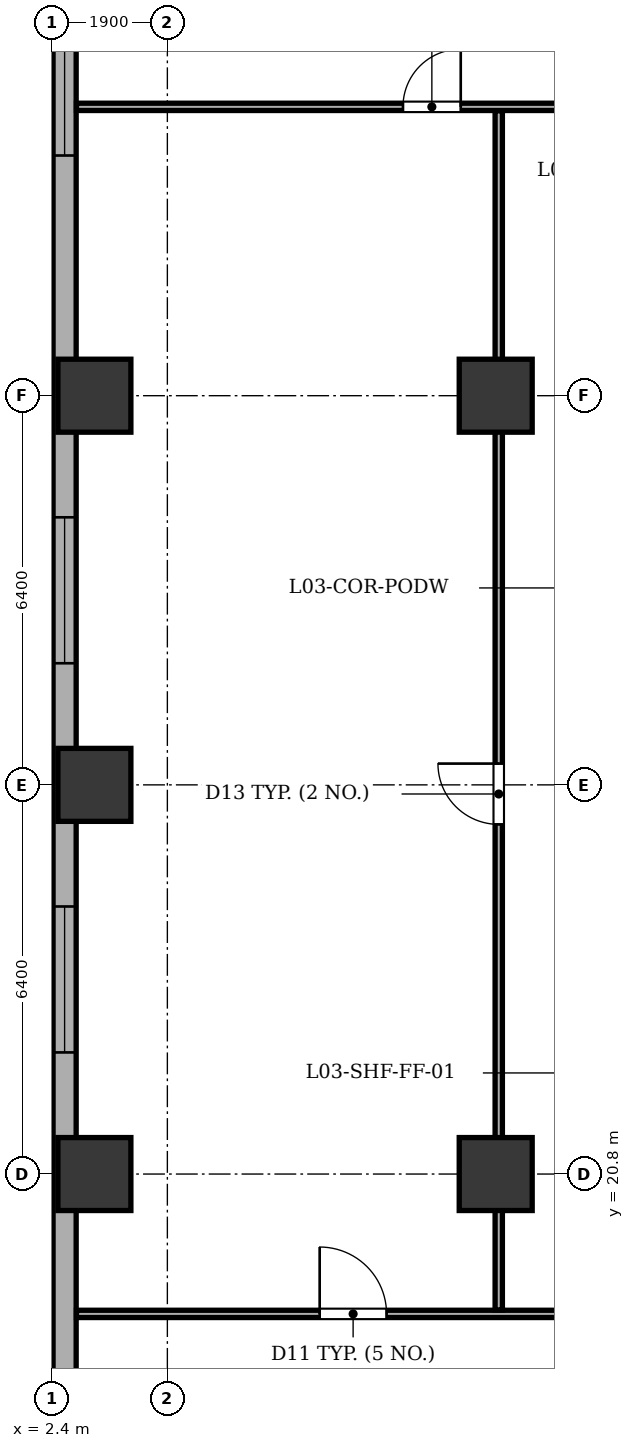
"""IFC4 building model, lengths in metres.
Left out: names, types, materials, properties, quantities, classifications, styles, units other than length and angle.
Written with IfcOpenShell. Run it as: python <this file> out.ifc"""

import sys

from ifc_helpers import new_model, si_unit, direction, frame, frame_2d, origin, origin_2d, place, context, subcontext, project, spatial, rectangle, extrude, element, fill, save


model = new_model("IFC4")
c1 = context("Model", 3, precision=1e-05, world=origin(), true_north=direction((0.0, 1.0)))
c2 = subcontext(c1, "Body", "Model", "MODEL_VIEW")
j1 = project(units=[si_unit("LENGTHUNIT", "METRE"), si_unit("PLANEANGLEUNIT", "RADIAN")], contexts=[c1])
p1 = place(None, origin())
s1 = spatial("IfcSite", under=j1, at=p1, CompositionType="ELEMENT")
p2 = place(p1, origin())
s2 = spatial("IfcBuilding", under=s1, at=p2, CompositionType="ELEMENT")
p3 = place(p2, frame((0.0, 0.0, 14.4)))
s3 = spatial("IfcBuildingStorey", under=s2, at=p3, CompositionType="ELEMENT", Elevation=14.4)
for number, where, z_axis, x_axis in (
    (1, (3.1, 20.8, 0.0), (0.0, 0.0, 1.0), (1.0, 0.0, 0.0)),
    (2, (3.1, 27.2, 0.0), (0.0, 0.0, 1.0), (1.0, 0.0, 0.0)),
    (3, (3.1, 33.6, 0.0), (0.0, 0.0, 1.0), (1.0, 0.0, 0.0)),
    (4, (9.7, 20.8, 0.0), (0.0, 0.0, 1.0), (1.0, 0.0, 0.0)),
    (5, (9.7, 33.6, 0.0), (0.0, 0.0, 1.0), (1.0, 0.0, 0.0)),
):
    element("IfcColumn", number, at=place(p3, frame(where, z_axis=z_axis, x_axis=x_axis)), inside=s3, PredefinedType="COLUMN", context=c2, shape_type="SweptSolid", body=[
        extrude(rectangle(XDim=1.2, YDim=1.2, at=origin_2d()), origin(), (0.0, 0.0, 1.0), 4.5),
    ])
p4 = place(p3, frame((2.61, 4.5, 0.0), z_axis=(0.0, 0.0, 1.0), x_axis=(0.0, 1.0, 0.0)))
e6 = element("IfcWall", 6, at=p4, inside=s3, PredefinedType="STANDARD", context=c2, shape_type="SweptSolid", body=[
    extrude(rectangle(XDim=45.4, YDim=0.38, at=frame_2d((22.7, 0.0))), origin(), (0.0, 0.0, 1.0), 4.0),
])
p5 = place(p4, frame((1.275, 0.0, 0.75)))
e7 = element("IfcOpeningElement", 7, at=p5, cuts=e6, PredefinedType="OPENING", context=c2, shape_type="SweptSolid", body=[
    extrude(rectangle(XDim=2.4, YDim=2.1, at=frame_2d((1.2, 1.05))), frame((0.0, 0.2, 0.0), z_axis=(0.0, -1.0, 0.0), x_axis=(1.0, 0.0, 0.0)), (0.0, 0.0, 1.0), 0.4),
])
p6 = place(p4, frame((9.95, 0.0, 0.75)))
e8 = element("IfcOpeningElement", 8, at=p6, cuts=e6, PredefinedType="OPENING", context=c2, shape_type="SweptSolid", body=[
    extrude(rectangle(XDim=2.4, YDim=2.1, at=frame_2d((1.2, 1.05))), frame((0.0, 0.2, 0.0), z_axis=(0.0, -1.0, 0.0), x_axis=(1.0, 0.0, 0.0)), (0.0, 0.0, 1.0), 0.4),
])
p7 = place(p4, frame((18.3, 0.0, 0.75)))
e9 = element("IfcOpeningElement", 9, at=p7, cuts=e6, PredefinedType="OPENING", context=c2, shape_type="SweptSolid", body=[
    extrude(rectangle(XDim=2.4, YDim=2.1, at=frame_2d((1.2, 1.05))), frame((0.0, 0.2, 0.0), z_axis=(0.0, -1.0, 0.0), x_axis=(1.0, 0.0, 0.0)), (0.0, 0.0, 1.0), 0.4),
])
p8 = place(p4, frame((24.7, 0.0, 0.75)))
e10 = element("IfcOpeningElement", 10, at=p8, cuts=e6, PredefinedType="OPENING", context=c2, shape_type="SweptSolid", body=[
    extrude(rectangle(XDim=2.4, YDim=2.1, at=frame_2d((1.2, 1.05))), frame((0.0, 0.2, 0.0), z_axis=(0.0, -1.0, 0.0), x_axis=(1.0, 0.0, 0.0)), (0.0, 0.0, 1.0), 0.4),
])
p9 = place(p4, frame((33.05, 0.0, 0.75)))
e11 = element("IfcOpeningElement", 11, at=p9, cuts=e6, PredefinedType="OPENING", context=c2, shape_type="SweptSolid", body=[
    extrude(rectangle(XDim=2.4, YDim=2.1, at=frame_2d((1.2, 1.05))), frame((0.0, 0.2, 0.0), z_axis=(0.0, -1.0, 0.0), x_axis=(1.0, 0.0, 0.0)), (0.0, 0.0, 1.0), 0.4),
])
p10 = place(p4, frame((41.725, 0.0, 0.75)))
e12 = element("IfcOpeningElement", 12, at=p10, cuts=e6, PredefinedType="OPENING", context=c2, shape_type="SweptSolid", body=[
    extrude(rectangle(XDim=2.4, YDim=2.1, at=frame_2d((1.2, 1.05))), frame((0.0, 0.2, 0.0), z_axis=(0.0, -1.0, 0.0), x_axis=(1.0, 0.0, 0.0)), (0.0, 0.0, 1.0), 0.4),
])
p11 = place(p3, frame((2.805, 18.5, 0.0), z_axis=(0.0, 0.0, 1.0), x_axis=(1.0, 0.0, 0.0)))
e13 = element("IfcWall", 13, at=p11, inside=s3, PredefinedType="PARTITIONING", context=c2, shape_type="SweptSolid", body=[
    extrude(rectangle(XDim=19.18, YDim=0.12, at=frame_2d((9.59, 0.0))), origin(), (0.0, 0.0, 1.0), 3.435),
])
p12 = place(p11, frame((4.0, 0.0, 0.0)))
e14 = element("IfcOpeningElement", 14, at=p12, cuts=e13, PredefinedType="OPENING", context=c2, shape_type="SweptSolid", body=[
    extrude(rectangle(XDim=1.1, YDim=2.15, at=frame_2d((0.55, 1.075))), frame((0.0, 0.07, 0.0), z_axis=(0.0, -1.0, 0.0), x_axis=(1.0, 0.0, 0.0)), (0.0, 0.0, 1.0), 0.14),
])
p13 = place(p11, frame((10.8, 0.0, 0.0)))
e15 = element("IfcOpeningElement", 15, at=p13, cuts=e13, PredefinedType="OPENING", context=c2, shape_type="SweptSolid", body=[
    extrude(rectangle(XDim=1.1, YDim=2.15, at=frame_2d((0.55, 1.075))), frame((0.0, 0.07, 0.0), z_axis=(0.0, -1.0, 0.0), x_axis=(1.0, 0.0, 0.0)), (0.0, 0.0, 1.0), 0.14),
])
p14 = place(p3, frame((2.805, 38.35, 0.0), z_axis=(0.0, 0.0, 1.0), x_axis=(1.0, 0.0, 0.0)))
e16 = element("IfcWall", 16, at=p14, inside=s3, PredefinedType="PARTITIONING", context=c2, shape_type="SweptSolid", body=[
    extrude(rectangle(XDim=54.79, YDim=0.12, at=frame_2d((27.395, 0.0))), origin(), (0.0, 0.0, 1.0), 4.0),
])
p15 = place(p14, frame((5.37, 0.0, 0.0)))
e17 = element("IfcOpeningElement", 17, at=p15, cuts=e16, PredefinedType="OPENING", context=c2, shape_type="SweptSolid", body=[
    extrude(rectangle(XDim=0.95, YDim=2.1, at=frame_2d((0.475, 1.05))), frame((0.0, 0.07, 0.0), z_axis=(0.0, -1.0, 0.0), x_axis=(1.0, 0.0, 0.0)), (0.0, 0.0, 1.0), 0.14),
])
p16 = place(p14, frame((15.12, 0.0, 0.0)))
e18 = element("IfcOpeningElement", 18, at=p16, cuts=e16, PredefinedType="OPENING", context=c2, shape_type="SweptSolid", body=[
    extrude(rectangle(XDim=0.95, YDim=2.1, at=frame_2d((0.475, 1.05))), frame((0.0, 0.07, 0.0), z_axis=(0.0, -1.0, 0.0), x_axis=(1.0, 0.0, 0.0)), (0.0, 0.0, 1.0), 0.14),
])
p17 = place(p14, frame((20.12, 0.0, 0.0)))
e19 = element("IfcOpeningElement", 19, at=p17, cuts=e16, PredefinedType="OPENING", context=c2, shape_type="SweptSolid", body=[
    extrude(rectangle(XDim=0.95, YDim=2.1, at=frame_2d((0.475, 1.05))), frame((0.0, 0.07, 0.0), z_axis=(0.0, -1.0, 0.0), x_axis=(1.0, 0.0, 0.0)), (0.0, 0.0, 1.0), 0.14),
])
p18 = place(p14, frame((24.87, 0.0, 0.0)))
e20 = element("IfcOpeningElement", 20, at=p18, cuts=e16, PredefinedType="OPENING", context=c2, shape_type="SweptSolid", body=[
    extrude(rectangle(XDim=0.95, YDim=2.1, at=frame_2d((0.475, 1.05))), frame((0.0, 0.07, 0.0), z_axis=(0.0, -1.0, 0.0), x_axis=(1.0, 0.0, 0.0)), (0.0, 0.0, 1.0), 0.14),
])
p19 = place(p14, frame((34.12, 0.0, 0.0)))
e21 = element("IfcOpeningElement", 21, at=p19, cuts=e16, PredefinedType="OPENING", context=c2, shape_type="SweptSolid", body=[
    extrude(rectangle(XDim=0.95, YDim=2.1, at=frame_2d((0.475, 1.05))), frame((0.0, 0.07, 0.0), z_axis=(0.0, -1.0, 0.0), x_axis=(1.0, 0.0, 0.0)), (0.0, 0.0, 1.0), 0.14),
])
p20 = place(p14, frame((47.12, 0.0, 0.0)))
e22 = element("IfcOpeningElement", 22, at=p20, cuts=e16, PredefinedType="OPENING", context=c2, shape_type="SweptSolid", body=[
    extrude(rectangle(XDim=0.95, YDim=2.1, at=frame_2d((0.475, 1.05))), frame((0.0, 0.07, 0.0), z_axis=(0.0, -1.0, 0.0), x_axis=(1.0, 0.0, 0.0)), (0.0, 0.0, 1.0), 0.14),
])
p21 = place(p3, frame((9.75, 18.565, 0.0), z_axis=(0.0, 0.0, 1.0), x_axis=(0.0, 1.0, 0.0)))
e23 = element("IfcWall", 23, at=p21, inside=s3, PredefinedType="PARTITIONING", context=c2, shape_type="SweptSolid", body=[
    extrude(rectangle(XDim=19.72, YDim=0.12, at=frame_2d((9.86, 0.0))), origin(), (0.0, 0.0, 1.0), 2.185),
])
p22 = place(p21, frame((7.985, 0.0, 0.0)))
e24 = element("IfcOpeningElement", 24, at=p22, cuts=e23, PredefinedType="OPENING", context=c2, shape_type="SweptSolid", body=[
    extrude(rectangle(XDim=1.0, YDim=2.1, at=frame_2d((0.5, 1.05))), frame((0.0, 0.07, 0.0), z_axis=(0.0, -1.0, 0.0), x_axis=(1.0, 0.0, 0.0)), (0.0, 0.0, 1.0), 0.14),
])
p23 = place(p7, origin())
e25 = element("IfcWindow", 25, at=p23, inside=s3, PartitioningType="SINGLE_PANEL", PredefinedType="WINDOW", context=c2, shape_type="SweptSolid", body=[
    extrude(rectangle(XDim=2.4, YDim=2.1, at=frame_2d((1.2, 1.05))), frame((0.0, 0.03, 0.0), z_axis=(0.0, -1.0, 0.0), x_axis=(1.0, 0.0, 0.0)), (0.0, 0.0, 1.0), 0.06),
])
fill(e9, e25)
p24 = place(p8, origin())
e26 = element("IfcWindow", 26, at=p24, inside=s3, PartitioningType="SINGLE_PANEL", PredefinedType="WINDOW", context=c2, shape_type="SweptSolid", body=[
    extrude(rectangle(XDim=2.4, YDim=2.1, at=frame_2d((1.2, 1.05))), frame((0.0, 0.03, 0.0), z_axis=(0.0, -1.0, 0.0), x_axis=(1.0, 0.0, 0.0)), (0.0, 0.0, 1.0), 0.06),
])
fill(e10, e26)
p25 = place(p9, origin())
e27 = element("IfcWindow", 27, at=p25, inside=s3, PartitioningType="SINGLE_PANEL", PredefinedType="WINDOW", context=c2, shape_type="SweptSolid", body=[
    extrude(rectangle(XDim=2.4, YDim=2.1, at=frame_2d((1.2, 1.05))), frame((0.0, 0.03, 0.0), z_axis=(0.0, -1.0, 0.0), x_axis=(1.0, 0.0, 0.0)), (0.0, 0.0, 1.0), 0.06),
])
fill(e11, e27)
p26 = place(p12, origin())
e28 = element("IfcDoor", 28, at=p26, inside=s3, OperationType="SINGLE_SWING_LEFT", PredefinedType="DOOR", context=c2, shape_type="SweptSolid", body=[
    extrude(rectangle(XDim=1.1, YDim=2.15, at=frame_2d((0.55, 1.075))), frame((0.0, 0.025, 0.0), z_axis=(0.0, -1.0, 0.0), x_axis=(1.0, 0.0, 0.0)), (0.0, 0.0, 1.0), 0.05),
])
fill(e14, e28)
p27 = place(p15, origin())
e29 = element("IfcDoor", 29, at=p27, inside=s3, OperationType="SINGLE_SWING_RIGHT", PredefinedType="DOOR", context=c2, shape_type="SweptSolid", body=[
    extrude(rectangle(XDim=0.95, YDim=2.1, at=frame_2d((0.475, 1.05))), frame((0.0, 0.025, 0.0), z_axis=(0.0, -1.0, 0.0), x_axis=(1.0, 0.0, 0.0)), (0.0, 0.0, 1.0), 0.05),
])
fill(e17, e29)
p28 = place(p22, origin())
e30 = element("IfcDoor", 30, at=p28, inside=s3, OperationType="SINGLE_SWING_RIGHT", PredefinedType="DOOR", context=c2, shape_type="SweptSolid", body=[
    extrude(rectangle(XDim=1.0, YDim=2.1, at=frame_2d((0.5, 1.05))), frame((0.0, 0.025, 0.0), z_axis=(0.0, -1.0, 0.0), x_axis=(1.0, 0.0, 0.0)), (0.0, 0.0, 1.0), 0.05),
])
fill(e24, e30)
save(model, sys.argv[1])
